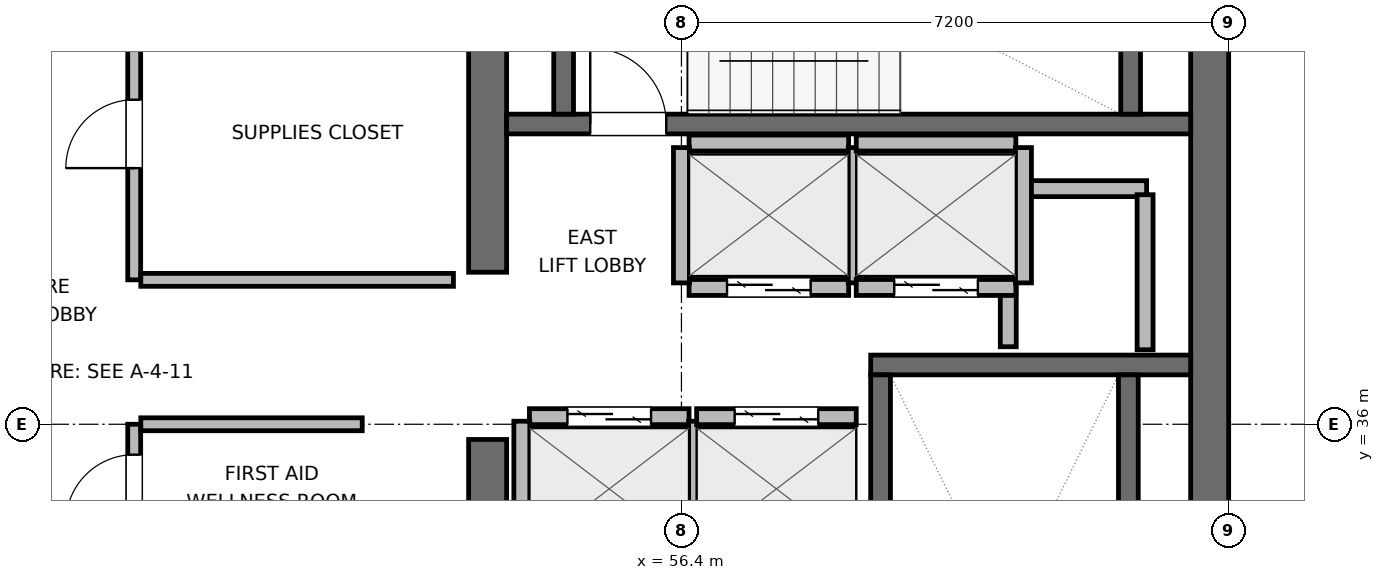
"""IFC4 building model, lengths in metres.
Left out: names, types, materials, properties, quantities, classifications, styles, units other than length and angle.
Written with IfcOpenShell. Run it as: python <this file> out.ifc"""

import sys

from ifc_helpers import new_model, si_unit, direction, frame, frame_2d, origin, place, context, subcontext, project, spatial, rectangle, extrude, element, fill, save


model = new_model("IFC4")
c1 = context("Model", 3, precision=1e-05, world=origin(), true_north=direction((0.0, 1.0)))
c2 = subcontext(c1, "Body", "Model", "MODEL_VIEW")
j1 = project(units=[si_unit("LENGTHUNIT", "METRE"), si_unit("PLANEANGLEUNIT", "RADIAN")], contexts=[c1])
p1 = place(None, origin())
s1 = spatial("IfcSite", under=j1, at=p1, CompositionType="ELEMENT")
p2 = place(p1, origin())
s2 = spatial("IfcBuilding", under=s1, at=p2, CompositionType="ELEMENT")
p3 = place(p2, frame((0.0, 0.0, 290.1)))
s3 = spatial("IfcBuildingStorey", under=s2, at=p3, CompositionType="ELEMENT", Elevation=290.1)
p4 = place(p3, frame((53.85, 27.85, 0.0), z_axis=(0.0, 0.0, 1.0), x_axis=(0.0, 1.0, 0.0)))
e1 = element("IfcWall", 1, at=p4, inside=s3, PredefinedType="SHEAR", context=c2, shape_type="SweptSolid", body=[
    extrude(rectangle(XDim=7.95, YDim=0.5, at=frame_2d((3.975, 0.0))), origin(), (0.0, 0.0, 1.0), 3.9),
])
p5 = place(p3, frame((53.85, 38.0, 0.0), z_axis=(0.0, 0.0, 1.0), x_axis=(0.0, 1.0, 0.0)))
e2 = element("IfcWall", 2, at=p5, inside=s3, PredefinedType="SHEAR", context=c2, shape_type="SweptSolid", body=[
    extrude(rectangle(XDim=6.15, YDim=0.5, at=frame_2d((3.075, 0.0))), origin(), (0.0, 0.0, 1.0), 3.9),
])
p6 = place(p3, frame((63.35, 27.6, 0.0), z_axis=(0.0, 0.0, 1.0), x_axis=(0.0, 1.0, 0.0)))
e3 = element("IfcWall", 3, at=p6, inside=s3, PredefinedType="SHEAR", context=c2, shape_type="SweptSolid", body=[
    extrude(rectangle(XDim=16.8, YDim=0.5, at=frame_2d((8.4, 0.0))), origin(), (0.0, 0.0, 1.0), 3.9),
])
p7 = place(p3, frame((58.89, 36.78, 0.0), z_axis=(0.0, 0.0, 1.0), x_axis=(1.0, 0.0, 0.0)))
e4 = element("IfcWall", 4, at=p7, inside=s3, PredefinedType="SHEAR", context=c2, shape_type="SweptSolid", body=[
    extrude(rectangle(XDim=4.21, YDim=0.26, at=frame_2d((2.105, 0.0))), origin(), (0.0, 0.0, 1.0), 3.9),
])
p8 = place(p3, frame((59.02, 29.05, 0.0), z_axis=(0.0, 0.0, 1.0), x_axis=(0.0, 1.0, 0.0)))
e5 = element("IfcWall", 5, at=p8, inside=s3, PredefinedType="SHEAR", context=c2, shape_type="SweptSolid", body=[
    extrude(rectangle(XDim=7.6, YDim=0.26, at=frame_2d((3.8, 0.0))), origin(), (0.0, 0.0, 1.0), 3.9),
])
p9 = place(p8, frame((0.3, 0.0, 0.0)))
e6 = element("IfcOpeningElement", 6, at=p9, cuts=e5, PredefinedType="OPENING", context=c2, shape_type="SweptSolid", body=[
    extrude(rectangle(XDim=1.0, YDim=2.04, at=frame_2d((0.5, 1.02))), frame((0.0, 0.14, 0.0), z_axis=(0.0, -1.0, 0.0), x_axis=(1.0, 0.0, 0.0)), (0.0, 0.0, 1.0), 0.28),
])
p10 = place(p3, frame((62.28, 29.05, 0.0), z_axis=(0.0, 0.0, 1.0), x_axis=(0.0, 1.0, 0.0)))
e7 = element("IfcWall", 7, at=p10, inside=s3, PredefinedType="SHEAR", context=c2, shape_type="SweptSolid", body=[
    extrude(rectangle(XDim=7.6, YDim=0.26, at=frame_2d((3.8, 0.0))), origin(), (0.0, 0.0, 1.0), 3.9),
])
p11 = place(p3, frame((54.1, 39.95, 0.0), z_axis=(0.0, 0.0, 1.0), x_axis=(1.0, 0.0, 0.0)))
e8 = element("IfcWall", 8, at=p11, inside=s3, PredefinedType="SHEAR", context=c2, shape_type="SweptSolid", body=[
    extrude(rectangle(XDim=9.0, YDim=0.26, at=frame_2d((4.5, 0.0))), origin(), (0.0, 0.0, 1.0), 3.9),
])
p12 = place(p11, frame((1.1, 0.0, 0.0)))
e9 = element("IfcOpeningElement", 9, at=p12, cuts=e8, PredefinedType="OPENING", context=c2, shape_type="SweptSolid", body=[
    extrude(rectangle(XDim=1.0, YDim=2.04, at=frame_2d((0.5, 1.02))), frame((0.0, 0.14, 0.0), z_axis=(0.0, -1.0, 0.0), x_axis=(1.0, 0.0, 0.0)), (0.0, 0.0, 1.0), 0.28),
])
for number, where, z_axis, x_axis in (
    (10, (54.85, 40.08, 0.0), (0.0, 0.0, 1.0), (0.0, 1.0, 0.0)),
    (11, (62.31, 40.08, 0.0), (0.0, 0.0, 1.0), (0.0, 1.0, 0.0)),
):
    element("IfcWall", number, at=place(p3, frame(where, z_axis=z_axis, x_axis=x_axis)), inside=s3, PredefinedType="SHEAR", context=c2, shape_type="SweptSolid", body=[
        extrude(rectangle(XDim=2.94, YDim=0.26, at=frame_2d((1.47, 0.0))), origin(), (0.0, 0.0, 1.0), 3.9),
    ])
p13 = place(p3, frame((60.72, 39.1, 0.0), z_axis=(0.0, 0.0, 1.0), x_axis=(1.0, 0.0, 0.0)))
e12 = element("IfcWall", 12, at=p13, inside=s3, PredefinedType="PARTITIONING", context=c2, shape_type="SweptSolid", body=[
    extrude(rectangle(XDim=1.8, YDim=0.21, at=frame_2d((0.9, 0.0))), origin(), (0.0, 0.0, 1.0), 3.68),
])
p14 = place(p3, frame((60.7, 37.02, 0.0), z_axis=(0.0, 0.0, 1.0), x_axis=(0.0, 1.0, 0.0)))
e13 = element("IfcWall", 13, at=p14, inside=s3, PredefinedType="PARTITIONING", context=c2, shape_type="SweptSolid", body=[
    extrude(rectangle(XDim=1.96, YDim=0.21, at=frame_2d((0.98, 0.0))), origin(), (0.0, 0.0, 1.0), 3.68),
])
p15 = place(p3, frame((62.5, 36.98, 0.0), z_axis=(0.0, 0.0, 1.0), x_axis=(0.0, 1.0, 0.0)))
e14 = element("IfcWall", 14, at=p15, inside=s3, PredefinedType="PARTITIONING", context=c2, shape_type="SweptSolid", body=[
    extrude(rectangle(XDim=2.04, YDim=0.21, at=frame_2d((1.02, 0.0))), origin(), (0.0, 0.0, 1.0), 3.68),
])
p16 = place(p3, frame((54.4, 36.1, 0.0), z_axis=(0.0, 0.0, 1.0), x_axis=(1.0, 0.0, 0.0)))
e15 = element("IfcWall", 15, at=p16, inside=s3, PredefinedType="PARTITIONING", context=c2, shape_type="SweptSolid", body=[
    extrude(rectangle(XDim=2.1, YDim=0.21, at=frame_2d((1.05, 0.0))), origin(), (0.0, 0.0, 1.0), 3.68),
])
p17 = place(p16, frame((0.5, 0.0, 0.0)))
e16 = element("IfcOpeningElement", 16, at=p17, cuts=e15, PredefinedType="OPENING", context=c2, shape_type="SweptSolid", body=[
    extrude(rectangle(XDim=1.1, YDim=2.04, at=frame_2d((0.55, 1.02))), frame((0.0, 0.115, 0.0), z_axis=(0.0, -1.0, 0.0), x_axis=(1.0, 0.0, 0.0)), (0.0, 0.0, 1.0), 0.23),
])
for number, where, z_axis, x_axis in (
    (17, (54.3, 34.26, 0.0), (0.0, 0.0, 1.0), (0.0, 1.0, 0.0)),
    (18, (56.6, 34.26, 0.0), (0.0, 0.0, 1.0), (0.0, 1.0, 0.0)),
):
    element("IfcWall", number, at=place(p3, frame(where, z_axis=z_axis, x_axis=x_axis)), inside=s3, PredefinedType="PARTITIONING", context=c2, shape_type="SweptSolid", body=[
        extrude(rectangle(XDim=1.78, YDim=0.21, at=frame_2d((0.89, 0.0))), origin(), (0.0, 0.0, 1.0), 3.68),
    ])
p18 = place(p3, frame((56.6, 36.1, 0.0), z_axis=(0.0, 0.0, 1.0), x_axis=(1.0, 0.0, 0.0)))
e19 = element("IfcWall", 19, at=p18, inside=s3, PredefinedType="PARTITIONING", context=c2, shape_type="SweptSolid", body=[
    extrude(rectangle(XDim=2.1, YDim=0.21, at=frame_2d((1.05, 0.0))), origin(), (0.0, 0.0, 1.0), 3.68),
])
p19 = place(p18, frame((0.5, 0.0, 0.0)))
e20 = element("IfcOpeningElement", 20, at=p19, cuts=e19, PredefinedType="OPENING", context=c2, shape_type="SweptSolid", body=[
    extrude(rectangle(XDim=1.1, YDim=2.04, at=frame_2d((0.55, 1.02))), frame((0.0, 0.115, 0.0), z_axis=(0.0, -1.0, 0.0), x_axis=(1.0, 0.0, 0.0)), (0.0, 0.0, 1.0), 0.23),
])
p20 = place(p3, frame((56.5, 37.8, 0.0), z_axis=(0.0, 0.0, 1.0), x_axis=(1.0, 0.0, 0.0)))
e21 = element("IfcWall", 21, at=p20, inside=s3, PredefinedType="PARTITIONING", context=c2, shape_type="SweptSolid", body=[
    extrude(rectangle(XDim=2.1, YDim=0.21, at=frame_2d((1.05, 0.0))), origin(), (0.0, 0.0, 1.0), 3.68),
])
p21 = place(p20, frame((0.5, 0.0, 0.0)))
e22 = element("IfcOpeningElement", 22, at=p21, cuts=e21, PredefinedType="OPENING", context=c2, shape_type="SweptSolid", body=[
    extrude(rectangle(XDim=1.1, YDim=2.04, at=frame_2d((0.55, 1.02))), frame((0.0, 0.115, 0.0), z_axis=(0.0, -1.0, 0.0), x_axis=(1.0, 0.0, 0.0)), (0.0, 0.0, 1.0), 0.23),
])
p22 = place(p3, frame((56.5, 39.7, 0.0), z_axis=(0.0, 0.0, 1.0), x_axis=(1.0, 0.0, 0.0)))
e23 = element("IfcWall", 23, at=p22, inside=s3, PredefinedType="PARTITIONING", context=c2, shape_type="SweptSolid", body=[
    extrude(rectangle(XDim=2.1, YDim=0.21, at=frame_2d((1.05, 0.0))), origin(), (0.0, 0.0, 1.0), 3.68),
])
for number, where, z_axis, x_axis in (
    (24, (56.4, 37.86, 0.0), (0.0, 0.0, 1.0), (0.0, 1.0, 0.0)),
    (25, (58.7, 37.86, 0.0), (0.0, 0.0, 1.0), (0.0, 1.0, 0.0)),
):
    element("IfcWall", number, at=place(p3, frame(where, z_axis=z_axis, x_axis=x_axis)), inside=s3, PredefinedType="PARTITIONING", context=c2, shape_type="SweptSolid", body=[
        extrude(rectangle(XDim=1.78, YDim=0.21, at=frame_2d((0.89, 0.0))), origin(), (0.0, 0.0, 1.0), 3.68),
    ])
p23 = place(p3, frame((58.7, 37.8, 0.0), z_axis=(0.0, 0.0, 1.0), x_axis=(1.0, 0.0, 0.0)))
e26 = element("IfcWall", 26, at=p23, inside=s3, PredefinedType="PARTITIONING", context=c2, shape_type="SweptSolid", body=[
    extrude(rectangle(XDim=2.1, YDim=0.21, at=frame_2d((1.05, 0.0))), origin(), (0.0, 0.0, 1.0), 3.68),
])
p24 = place(p23, frame((0.5, 0.0, 0.0)))
e27 = element("IfcOpeningElement", 27, at=p24, cuts=e26, PredefinedType="OPENING", context=c2, shape_type="SweptSolid", body=[
    extrude(rectangle(XDim=1.1, YDim=2.04, at=frame_2d((0.55, 1.02))), frame((0.0, 0.115, 0.0), z_axis=(0.0, -1.0, 0.0), x_axis=(1.0, 0.0, 0.0)), (0.0, 0.0, 1.0), 0.23),
])
p25 = place(p3, frame((58.7, 39.7, 0.0), z_axis=(0.0, 0.0, 1.0), x_axis=(1.0, 0.0, 0.0)))
e28 = element("IfcWall", 28, at=p25, inside=s3, PredefinedType="PARTITIONING", context=c2, shape_type="SweptSolid", body=[
    extrude(rectangle(XDim=2.1, YDim=0.21, at=frame_2d((1.05, 0.0))), origin(), (0.0, 0.0, 1.0), 3.68),
])
p26 = place(p3, frame((60.9, 37.86, 0.0), z_axis=(0.0, 0.0, 1.0), x_axis=(0.0, 1.0, 0.0)))
e29 = element("IfcWall", 29, at=p26, inside=s3, PredefinedType="PARTITIONING", context=c2, shape_type="SweptSolid", body=[
    extrude(rectangle(XDim=1.78, YDim=0.21, at=frame_2d((0.89, 0.0))), origin(), (0.0, 0.0, 1.0), 3.68),
])
p27 = place(p3, frame((49.2, 32.6, 0.0), z_axis=(0.0, 0.0, 1.0), x_axis=(0.0, 1.0, 0.0)))
e30 = element("IfcWall", 30, at=p27, inside=s3, PredefinedType="PARTITIONING", context=c2, shape_type="SweptSolid", body=[
    extrude(rectangle(XDim=3.4, YDim=0.17, at=frame_2d((1.7, 0.0))), origin(), (0.0, 0.0, 1.0), 3.68),
])
p28 = place(p27, frame((0.4, 0.0, 0.0)))
e31 = element("IfcOpeningElement", 31, at=p28, cuts=e30, PredefinedType="OPENING", context=c2, shape_type="SweptSolid", body=[
    extrude(rectangle(XDim=0.9, YDim=2.02, at=frame_2d((0.45, 1.01))), frame((0.0, 0.095, 0.0), z_axis=(0.0, -1.0, 0.0), x_axis=(1.0, 0.0, 0.0)), (0.0, 0.0, 1.0), 0.19),
])
p29 = place(p27, frame((2.1, 0.0, 0.0)))
e32 = element("IfcOpeningElement", 32, at=p29, cuts=e30, PredefinedType="OPENING", context=c2, shape_type="SweptSolid", body=[
    extrude(rectangle(XDim=0.9, YDim=2.02, at=frame_2d((0.45, 1.01))), frame((0.0, 0.095, 0.0), z_axis=(0.0, -1.0, 0.0), x_axis=(1.0, 0.0, 0.0)), (0.0, 0.0, 1.0), 0.19),
])
p30 = place(p3, frame((49.287, 36.0, 0.0), z_axis=(0.0, 0.0, 1.0), x_axis=(1.0, 0.0, 0.0)))
e33 = element("IfcWall", 33, at=p30, inside=s3, PredefinedType="PARTITIONING", context=c2, shape_type="SweptSolid", body=[
    extrude(rectangle(XDim=2.913, YDim=0.17, at=frame_2d((1.457, 0.0))), origin(), (0.0, 0.0, 1.0), 3.68),
])
p31 = place(p3, frame((49.2, 37.9, 0.0), z_axis=(0.0, 0.0, 1.0), x_axis=(0.0, 1.0, 0.0)))
e34 = element("IfcWall", 34, at=p31, inside=s3, PredefinedType="PARTITIONING", context=c2, shape_type="SweptSolid", body=[
    extrude(rectangle(XDim=6.0, YDim=0.17, at=frame_2d((3.0, 0.0))), origin(), (0.0, 0.0, 1.0), 3.68),
])
p32 = place(p31, frame((1.47, 0.0, 0.0)))
e35 = element("IfcOpeningElement", 35, at=p32, cuts=e34, PredefinedType="OPENING", context=c2, shape_type="SweptSolid", body=[
    extrude(rectangle(XDim=0.9, YDim=2.02, at=frame_2d((0.45, 1.01))), frame((0.0, 0.095, 0.0), z_axis=(0.0, -1.0, 0.0), x_axis=(1.0, 0.0, 0.0)), (0.0, 0.0, 1.0), 0.19),
])
p33 = place(p31, frame((4.47, 0.0, 0.0)))
e36 = element("IfcOpeningElement", 36, at=p33, cuts=e34, PredefinedType="OPENING", context=c2, shape_type="SweptSolid", body=[
    extrude(rectangle(XDim=0.9, YDim=2.02, at=frame_2d((0.45, 1.01))), frame((0.0, 0.095, 0.0), z_axis=(0.0, -1.0, 0.0), x_axis=(1.0, 0.0, 0.0)), (0.0, 0.0, 1.0), 0.19),
])
p34 = place(p3, frame((49.287, 37.9, 0.0), z_axis=(0.0, 0.0, 1.0), x_axis=(1.0, 0.0, 0.0)))
e37 = element("IfcWall", 37, at=p34, inside=s3, PredefinedType="PARTITIONING", context=c2, shape_type="SweptSolid", body=[
    extrude(rectangle(XDim=4.113, YDim=0.17, at=frame_2d((2.056, 0.0))), origin(), (0.0, 0.0, 1.0), 3.68),
])
p35 = place(p12, origin())
e38 = element("IfcDoor", 38, at=p35, inside=s3, OperationType="SINGLE_SWING_LEFT", PredefinedType="DOOR", context=c2, shape_type="SweptSolid", body=[
    extrude(rectangle(XDim=1.0, YDim=2.04, at=frame_2d((0.5, 1.02))), frame((0.0, 0.025, 0.0), z_axis=(0.0, -1.0, 0.0), x_axis=(1.0, 0.0, 0.0)), (0.0, 0.0, 1.0), 0.05),
])
fill(e9, e38)
p36 = place(p17, origin())
e39 = element("IfcDoor", 39, at=p36, inside=s3, OperationType="DOUBLE_DOOR_SLIDING", PredefinedType="DOOR", context=c2, shape_type="SweptSolid", body=[
    extrude(rectangle(XDim=1.1, YDim=2.04, at=frame_2d((0.55, 1.02))), frame((0.0, 0.025, 0.0), z_axis=(0.0, -1.0, 0.0), x_axis=(1.0, 0.0, 0.0)), (0.0, 0.0, 1.0), 0.05),
])
fill(e16, e39)
p37 = place(p19, origin())
e40 = element("IfcDoor", 40, at=p37, inside=s3, OperationType="DOUBLE_DOOR_SLIDING", PredefinedType="DOOR", context=c2, shape_type="SweptSolid", body=[
    extrude(rectangle(XDim=1.1, YDim=2.04, at=frame_2d((0.55, 1.02))), frame((0.0, 0.025, 0.0), z_axis=(0.0, -1.0, 0.0), x_axis=(1.0, 0.0, 0.0)), (0.0, 0.0, 1.0), 0.05),
])
fill(e20, e40)
p38 = place(p21, origin())
e41 = element("IfcDoor", 41, at=p38, inside=s3, OperationType="DOUBLE_DOOR_SLIDING", PredefinedType="DOOR", context=c2, shape_type="SweptSolid", body=[
    extrude(rectangle(XDim=1.1, YDim=2.04, at=frame_2d((0.55, 1.02))), frame((0.0, 0.025, 0.0), z_axis=(0.0, -1.0, 0.0), x_axis=(1.0, 0.0, 0.0)), (0.0, 0.0, 1.0), 0.05),
])
fill(e22, e41)
p39 = place(p24, origin())
e42 = element("IfcDoor", 42, at=p39, inside=s3, OperationType="DOUBLE_DOOR_SLIDING", PredefinedType="DOOR", context=c2, shape_type="SweptSolid", body=[
    extrude(rectangle(XDim=1.1, YDim=2.04, at=frame_2d((0.55, 1.02))), frame((0.0, 0.025, 0.0), z_axis=(0.0, -1.0, 0.0), x_axis=(1.0, 0.0, 0.0)), (0.0, 0.0, 1.0), 0.05),
])
fill(e27, e42)
p40 = place(p29, origin())
e43 = element("IfcDoor", 43, at=p40, inside=s3, OperationType="SINGLE_SWING_LEFT", PredefinedType="DOOR", context=c2, shape_type="SweptSolid", body=[
    extrude(rectangle(XDim=0.9, YDim=2.02, at=frame_2d((0.45, 1.01))), frame((0.0, 0.025, 0.0), z_axis=(0.0, -1.0, 0.0), x_axis=(1.0, 0.0, 0.0)), (0.0, 0.0, 1.0), 0.05),
])
fill(e32, e43)
p41 = place(p32, origin())
e44 = element("IfcDoor", 44, at=p41, inside=s3, OperationType="SINGLE_SWING_LEFT", PredefinedType="DOOR", context=c2, shape_type="SweptSolid", body=[
    extrude(rectangle(XDim=0.9, YDim=2.02, at=frame_2d((0.45, 1.01))), frame((0.0, 0.025, 0.0), z_axis=(0.0, -1.0, 0.0), x_axis=(1.0, 0.0, 0.0)), (0.0, 0.0, 1.0), 0.05),
])
fill(e35, e44)
save(model, sys.argv[1])
